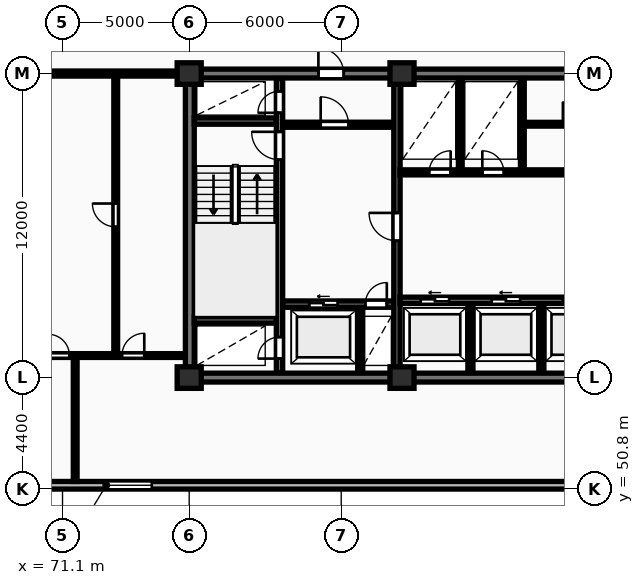
"""IFC4 building model, lengths in metres.
Left out: names, types, materials, properties, quantities, classifications, styles, units other than length and angle.
Written with IfcOpenShell. Run it as: python <this file> out.ifc"""

import sys

from ifc_helpers import new_model, si_unit, direction, frame, frame_2d, origin, origin_2d, place, context, subcontext, project, spatial, rectangle, extrude, element, fill, save


model = new_model("IFC4")
c1 = context("Model", 3, precision=1e-05, world=origin(), true_north=direction((0.0, 1.0)))
c2 = subcontext(c1, "Body", "Model", "MODEL_VIEW")
j1 = project(units=[si_unit("LENGTHUNIT", "METRE"), si_unit("PLANEANGLEUNIT", "RADIAN")], contexts=[c1])
p1 = place(None, origin())
s1 = spatial("IfcSite", under=j1, at=p1, CompositionType="ELEMENT")
p2 = place(p1, origin())
s2 = spatial("IfcBuilding", under=s1, at=p2, CompositionType="ELEMENT")
p3 = place(p2, frame((0.0, 0.0, 93.8)))
s3 = spatial("IfcBuildingStorey", under=s2, at=p3, CompositionType="ELEMENT", Elevation=93.8)
for number, where, z_axis, x_axis in (
    (1, (76.1, 55.2, 0.0), (0.0, 0.0, 1.0), (1.0, 0.0, 0.0)),
    (2, (76.1, 67.2, 0.0), (0.0, 0.0, 1.0), (1.0, 0.0, 0.0)),
    (3, (84.5, 55.2, 0.0), (0.0, 0.0, 1.0), (1.0, 0.0, 0.0)),
    (4, (84.5, 67.2, 0.0), (0.0, 0.0, 1.0), (1.0, 0.0, 0.0)),
):
    element("IfcColumn", number, at=place(p3, frame(where, z_axis=z_axis, x_axis=x_axis)), inside=s3, PredefinedType="COLUMN", context=c2, shape_type="SweptSolid", body=[
        extrude(rectangle(XDim=0.95, YDim=0.85, at=origin_2d()), origin(), (0.0, 0.0, 1.0), 3.25),
    ])
p4 = place(p3, frame((57.6, 50.95, 0.0), z_axis=(0.0, 0.0, 1.0), x_axis=(1.0, 0.0, 0.0)))
e5 = element("IfcWall", 5, at=p4, inside=s3, PredefinedType="STANDARD", context=c2, shape_type="SweptSolid", body=[
    extrude(rectangle(XDim=73.0, YDim=0.3, at=frame_2d((36.5, 0.0))), origin(), (0.0, 0.0, 1.0), 2.97),
])
p5 = place(p4, frame((15.225, 0.0, 0.85)))
e6 = element("IfcOpeningElement", 6, at=p5, cuts=e5, PredefinedType="OPENING", context=c2, shape_type="SweptSolid", body=[
    extrude(rectangle(XDim=1.8, YDim=1.8, at=frame_2d((0.9, 0.9))), frame((0.0, 0.16, 0.0), z_axis=(0.0, -1.0, 0.0), x_axis=(1.0, 0.0, 0.0)), (0.0, 0.0, 1.0), 0.32),
])
p6 = place(p4, frame((58.575, 0.0, 0.85)))
e7 = element("IfcOpeningElement", 7, at=p6, cuts=e5, PredefinedType="OPENING", context=c2, shape_type="SweptSolid", body=[
    extrude(rectangle(XDim=1.8, YDim=1.8, at=frame_2d((0.9, 0.9))), frame((0.0, 0.16, 0.0), z_axis=(0.0, -1.0, 0.0), x_axis=(1.0, 0.0, 0.0)), (0.0, 0.0, 1.0), 0.32),
])
p7 = place(p3, frame((75.95, 55.2, 0.0), z_axis=(0.0, 0.0, 1.0), x_axis=(1.0, 0.0, 0.0)))
e8 = element("IfcWall", 8, at=p7, inside=s3, PredefinedType="SHEAR", context=c2, shape_type="SweptSolid", body=[
    extrude(rectangle(XDim=36.3, YDim=0.35, at=frame_2d((18.15, 0.0))), origin(), (0.0, 0.0, 1.0), 3.25),
])
p8 = place(p3, frame((76.125, 55.375, 0.0), z_axis=(0.0, 0.0, 1.0), x_axis=(0.0, 1.0, 0.0)))
e9 = element("IfcWall", 9, at=p8, inside=s3, PredefinedType="SHEAR", context=c2, shape_type="SweptSolid", body=[
    extrude(rectangle(XDim=11.65, YDim=0.35, at=frame_2d((5.825, 0.0))), origin(), (0.0, 0.0, 1.0), 3.25),
])
p9 = place(p3, frame((75.95, 67.2, 0.0), z_axis=(0.0, 0.0, 1.0), x_axis=(1.0, 0.0, 0.0)))
e10 = element("IfcWall", 10, at=p9, inside=s3, PredefinedType="SHEAR", context=c2, shape_type="SweptSolid", body=[
    extrude(rectangle(XDim=36.3, YDim=0.35, at=frame_2d((18.15, 0.0))), origin(), (0.0, 0.0, 1.0), 3.25),
])
p10 = place(p9, frame((5.25, 0.0, 0.0)))
e11 = element("IfcOpeningElement", 11, at=p10, cuts=e10, PredefinedType="OPENING", context=c2, shape_type="SweptSolid", body=[
    extrude(rectangle(XDim=1.0, YDim=2.15, at=frame_2d((0.5, 1.075))), frame((0.0, 0.185, 0.0), z_axis=(0.0, -1.0, 0.0), x_axis=(1.0, 0.0, 0.0)), (0.0, 0.0, 1.0), 0.37),
])
p11 = place(p9, frame((21.6, 0.0, 0.0)))
e12 = element("IfcOpeningElement", 12, at=p11, cuts=e10, PredefinedType="OPENING", context=c2, shape_type="SweptSolid", body=[
    extrude(rectangle(XDim=1.5, YDim=2.2, at=frame_2d((0.75, 1.1))), frame((0.0, 0.185, 0.0), z_axis=(0.0, -1.0, 0.0), x_axis=(1.0, 0.0, 0.0)), (0.0, 0.0, 1.0), 0.37),
])
p12 = place(p9, frame((30.45, 0.0, 0.0)))
e13 = element("IfcOpeningElement", 13, at=p12, cuts=e10, PredefinedType="OPENING", context=c2, shape_type="SweptSolid", body=[
    extrude(rectangle(XDim=1.0, YDim=2.15, at=frame_2d((0.5, 1.075))), frame((0.0, 0.185, 0.0), z_axis=(0.0, -1.0, 0.0), x_axis=(1.0, 0.0, 0.0)), (0.0, 0.0, 1.0), 0.37),
])
p13 = place(p3, frame((79.665, 55.4, 0.0), z_axis=(0.0, 0.0, 1.0), x_axis=(0.0, 1.0, 0.0)))
e14 = element("IfcWall", 14, at=p13, inside=s3, PredefinedType="SHEAR", context=c2, shape_type="SweptSolid", body=[
    extrude(rectangle(XDim=11.6, YDim=0.25, at=frame_2d((5.8, 0.0))), origin(), (0.0, 0.0, 1.0), 3.25),
])
p14 = place(p13, frame((0.55, 0.0, 0.0)))
e15 = element("IfcOpeningElement", 15, at=p14, cuts=e14, PredefinedType="OPENING", context=c2, shape_type="SweptSolid", body=[
    extrude(rectangle(XDim=0.85, YDim=2.05, at=frame_2d((0.425, 1.025))), frame((0.0, 0.135, 0.0), z_axis=(0.0, -1.0, 0.0), x_axis=(1.0, 0.0, 0.0)), (0.0, 0.0, 1.0), 0.27),
])
p15 = place(p13, frame((8.4, 0.0, 0.0)))
e16 = element("IfcOpeningElement", 16, at=p15, cuts=e14, PredefinedType="OPENING", context=c2, shape_type="SweptSolid", body=[
    extrude(rectangle(XDim=1.1, YDim=2.1, at=frame_2d((0.55, 1.05))), frame((0.0, 0.135, 0.0), z_axis=(0.0, -1.0, 0.0), x_axis=(1.0, 0.0, 0.0)), (0.0, 0.0, 1.0), 0.27),
])
p16 = place(p13, frame((10.25, 0.0, 0.0)))
e17 = element("IfcOpeningElement", 17, at=p16, cuts=e14, PredefinedType="OPENING", context=c2, shape_type="SweptSolid", body=[
    extrude(rectangle(XDim=0.85, YDim=2.05, at=frame_2d((0.425, 1.025))), frame((0.0, 0.135, 0.0), z_axis=(0.0, -1.0, 0.0), x_axis=(1.0, 0.0, 0.0)), (0.0, 0.0, 1.0), 0.27),
])
for number, where, z_axis, x_axis in (
    (18, (76.3, 57.475, 0.0), (0.0, 0.0, 1.0), (1.0, 0.0, 0.0)),
    (19, (76.3, 65.325, 0.0), (0.0, 0.0, 1.0), (1.0, 0.0, 0.0)),
):
    element("IfcWall", number, at=place(p3, frame(where, z_axis=z_axis, x_axis=x_axis)), inside=s3, PredefinedType="SHEAR", context=c2, shape_type="SweptSolid", body=[
        extrude(rectangle(XDim=3.24, YDim=0.25, at=frame_2d((1.62, 0.0))), origin(), (0.0, 0.0, 1.0), 3.25),
    ])
p17 = place(p3, frame((79.79, 58.1, 0.0), z_axis=(0.0, 0.0, 1.0), x_axis=(1.0, 0.0, 0.0)))
e20 = element("IfcWall", 20, at=p17, inside=s3, PredefinedType="SHEAR", context=c2, shape_type="SweptSolid", body=[
    extrude(rectangle(XDim=4.39, YDim=0.25, at=frame_2d((2.195, 0.0))), origin(), (0.0, 0.0, 1.0), 3.25),
])
p18 = place(p17, frame((1.05, 0.0, 0.0)))
e21 = element("IfcOpeningElement", 21, at=p18, cuts=e20, PredefinedType="OPENING", context=c2, shape_type="SweptSolid", body=[
    extrude(rectangle(XDim=1.12, YDim=2.12, at=frame_2d((0.56, 1.06))), frame((0.0, 0.135, 0.0), z_axis=(0.0, -1.0, 0.0), x_axis=(1.0, 0.0, 0.0)), (0.0, 0.0, 1.0), 0.27),
])
p19 = place(p17, frame((3.26, 0.0, 0.0)))
e22 = element("IfcOpeningElement", 22, at=p19, cuts=e20, PredefinedType="OPENING", context=c2, shape_type="SweptSolid", body=[
    extrude(rectangle(XDim=0.85, YDim=2.05, at=frame_2d((0.425, 1.025))), frame((0.0, 0.135, 0.0), z_axis=(0.0, -1.0, 0.0), x_axis=(1.0, 0.0, 0.0)), (0.0, 0.0, 1.0), 0.27),
])
p20 = place(p3, frame((82.85, 55.4, 0.0), z_axis=(0.0, 0.0, 1.0), x_axis=(0.0, 1.0, 0.0)))
e23 = element("IfcWall", 23, at=p20, inside=s3, PredefinedType="PARTITIONING", context=c2, shape_type="SweptSolid", body=[
    extrude(rectangle(XDim=2.56, YDim=0.2, at=frame_2d((1.28, 0.0))), origin(), (0.0, 0.0, 1.0), 2.97),
])
p21 = place(p3, frame((79.79, 65.18, 0.0), z_axis=(0.0, 0.0, 1.0), x_axis=(1.0, 0.0, 0.0)))
e24 = element("IfcWall", 24, at=p21, inside=s3, PredefinedType="PARTITIONING", context=c2, shape_type="SweptSolid", body=[
    extrude(rectangle(XDim=4.39, YDim=0.2, at=frame_2d((2.195, 0.0))), origin(), (0.0, 0.0, 1.0), 2.97),
])
p22 = place(p21, frame((1.5, 0.0, 0.0)))
e25 = element("IfcOpeningElement", 25, at=p22, cuts=e24, PredefinedType="OPENING", context=c2, shape_type="SweptSolid", body=[
    extrude(rectangle(XDim=1.1, YDim=2.1, at=frame_2d((0.55, 1.05))), frame((0.0, 0.11, 0.0), z_axis=(0.0, -1.0, 0.0), x_axis=(1.0, 0.0, 0.0)), (0.0, 0.0, 1.0), 0.22),
])
p23 = place(p3, frame((84.3, 55.4, 0.0), z_axis=(0.0, 0.0, 1.0), x_axis=(0.0, 1.0, 0.0)))
e26 = element("IfcWall", 26, at=p23, inside=s3, PredefinedType="SHEAR", context=c2, shape_type="SweptSolid", body=[
    extrude(rectangle(XDim=11.6, YDim=0.25, at=frame_2d((5.8, 0.0))), origin(), (0.0, 0.0, 1.0), 3.25),
])
p24 = place(p23, frame((5.2, 0.0, 0.0)))
e27 = element("IfcOpeningElement", 27, at=p24, cuts=e26, PredefinedType="OPENING", context=c2, shape_type="SweptSolid", body=[
    extrude(rectangle(XDim=1.1, YDim=2.1, at=frame_2d((0.55, 1.05))), frame((0.0, 0.135, 0.0), z_axis=(0.0, -1.0, 0.0), x_axis=(1.0, 0.0, 0.0)), (0.0, 0.0, 1.0), 0.27),
])
for number, where, z_axis, x_axis in (
    (28, (87.2, 55.4, 0.0), (0.0, 0.0, 1.0), (0.0, 1.0, 0.0)),
    (29, (90.0, 55.4, 0.0), (0.0, 0.0, 1.0), (0.0, 1.0, 0.0)),
):
    element("IfcWall", number, at=place(p3, frame(where, z_axis=z_axis, x_axis=x_axis)), inside=s3, PredefinedType="PARTITIONING", context=c2, shape_type="SweptSolid", body=[
        extrude(rectangle(XDim=2.72, YDim=0.2, at=frame_2d((1.36, 0.0))), origin(), (0.0, 0.0, 1.0), 2.97),
    ])
p25 = place(p3, frame((84.42, 58.25, 0.0), z_axis=(0.0, 0.0, 1.0), x_axis=(1.0, 0.0, 0.0)))
e30 = element("IfcWall", 30, at=p25, inside=s3, PredefinedType="SHEAR", context=c2, shape_type="SweptSolid", body=[
    extrude(rectangle(XDim=8.36, YDim=0.25, at=frame_2d((4.18, 0.0))), origin(), (0.0, 0.0, 1.0), 3.25),
])
p26 = place(p25, frame((0.82, 0.0, 0.0)))
e31 = element("IfcOpeningElement", 31, at=p26, cuts=e30, PredefinedType="OPENING", context=c2, shape_type="SweptSolid", body=[
    extrude(rectangle(XDim=1.12, YDim=2.12, at=frame_2d((0.56, 1.06))), frame((0.0, 0.135, 0.0), z_axis=(0.0, -1.0, 0.0), x_axis=(1.0, 0.0, 0.0)), (0.0, 0.0, 1.0), 0.27),
])
p27 = place(p25, frame((3.62, 0.0, 0.0)))
e32 = element("IfcOpeningElement", 32, at=p27, cuts=e30, PredefinedType="OPENING", context=c2, shape_type="SweptSolid", body=[
    extrude(rectangle(XDim=1.12, YDim=2.12, at=frame_2d((0.56, 1.06))), frame((0.0, 0.135, 0.0), z_axis=(0.0, -1.0, 0.0), x_axis=(1.0, 0.0, 0.0)), (0.0, 0.0, 1.0), 0.27),
])
p28 = place(p25, frame((6.42, 0.0, 0.0)))
e33 = element("IfcOpeningElement", 33, at=p28, cuts=e30, PredefinedType="OPENING", context=c2, shape_type="SweptSolid", body=[
    extrude(rectangle(XDim=1.12, YDim=2.12, at=frame_2d((0.56, 1.06))), frame((0.0, 0.135, 0.0), z_axis=(0.0, -1.0, 0.0), x_axis=(1.0, 0.0, 0.0)), (0.0, 0.0, 1.0), 0.27),
])
for number, where, z_axis, x_axis in (
    (34, (86.8, 63.4, 0.0), (0.0, 0.0, 1.0), (0.0, 1.0, 0.0)),
    (35, (89.25, 63.4, 0.0), (0.0, 0.0, 1.0), (0.0, 1.0, 0.0)),
):
    element("IfcWall", number, at=place(p3, frame(where, z_axis=z_axis, x_axis=x_axis)), inside=s3, PredefinedType="PARTITIONING", context=c2, shape_type="SweptSolid", body=[
        extrude(rectangle(XDim=3.6, YDim=0.15, at=frame_2d((1.8, 0.0))), origin(), (0.0, 0.0, 1.0), 2.97),
    ])
p29 = place(p3, frame((89.25, 65.2, 0.0), z_axis=(0.0, 0.0, 1.0), x_axis=(1.0, 0.0, 0.0)))
e36 = element("IfcWall", 36, at=p29, inside=s3, PredefinedType="PARTITIONING", context=c2, shape_type="SweptSolid", body=[
    extrude(rectangle(XDim=7.05, YDim=0.15, at=frame_2d((3.525, 0.0))), origin(), (0.0, 0.0, 1.0), 2.97),
])
p30 = place(p29, frame((1.6, 0.0, 0.0)))
e37 = element("IfcOpeningElement", 37, at=p30, cuts=e36, PredefinedType="OPENING", context=c2, shape_type="SweptSolid", body=[
    extrude(rectangle(XDim=0.88, YDim=2.06, at=frame_2d((0.44, 1.03))), frame((0.0, 0.085, 0.0), z_axis=(0.0, -1.0, 0.0), x_axis=(1.0, 0.0, 0.0)), (0.0, 0.0, 1.0), 0.17),
])
p31 = place(p3, frame((84.42, 63.3, 0.0), z_axis=(0.0, 0.0, 1.0), x_axis=(1.0, 0.0, 0.0)))
e38 = element("IfcWall", 38, at=p31, inside=s3, PredefinedType="PARTITIONING", context=c2, shape_type="SweptSolid", body=[
    extrude(rectangle(XDim=19.83, YDim=0.2, at=frame_2d((9.915, 0.0))), origin(), (0.0, 0.0, 1.0), 2.97),
])
p32 = place(p31, frame((1.15, 0.0, 0.0)))
e39 = element("IfcOpeningElement", 39, at=p32, cuts=e38, PredefinedType="OPENING", context=c2, shape_type="SweptSolid", body=[
    extrude(rectangle(XDim=0.85, YDim=2.05, at=frame_2d((0.425, 1.025))), frame((0.0, 0.11, 0.0), z_axis=(0.0, -1.0, 0.0), x_axis=(1.0, 0.0, 0.0)), (0.0, 0.0, 1.0), 0.22),
])
p33 = place(p31, frame((3.25, 0.0, 0.0)))
e40 = element("IfcOpeningElement", 40, at=p33, cuts=e38, PredefinedType="OPENING", context=c2, shape_type="SweptSolid", body=[
    extrude(rectangle(XDim=0.85, YDim=2.05, at=frame_2d((0.425, 1.025))), frame((0.0, 0.11, 0.0), z_axis=(0.0, -1.0, 0.0), x_axis=(1.0, 0.0, 0.0)), (0.0, 0.0, 1.0), 0.22),
])
p34 = place(p31, frame((13.08, 0.0, 0.0)))
e41 = element("IfcOpeningElement", 41, at=p34, cuts=e38, PredefinedType="OPENING", context=c2, shape_type="SweptSolid", body=[
    extrude(rectangle(XDim=1.5, YDim=2.2, at=frame_2d((0.75, 1.1))), frame((0.0, 0.11, 0.0), z_axis=(0.0, -1.0, 0.0), x_axis=(1.0, 0.0, 0.0)), (0.0, 0.0, 1.0), 0.22),
])
p35 = place(p31, frame((6.68, 0.0, 0.0)))
e42 = element("IfcOpeningElement", 42, at=p35, cuts=e38, PredefinedType="OPENING", context=c2, shape_type="SweptSolid", body=[
    extrude(rectangle(XDim=0.92, YDim=2.08, at=frame_2d((0.46, 1.04))), frame((0.0, 0.11, 0.0), z_axis=(0.0, -1.0, 0.0), x_axis=(1.0, 0.0, 0.0)), (0.0, 0.0, 1.0), 0.22),
])
p36 = place(p31, frame((16.33, 0.0, 0.0)))
e43 = element("IfcOpeningElement", 43, at=p36, cuts=e38, PredefinedType="OPENING", context=c2, shape_type="SweptSolid", body=[
    extrude(rectangle(XDim=0.88, YDim=2.06, at=frame_2d((0.44, 1.03))), frame((0.0, 0.11, 0.0), z_axis=(0.0, -1.0, 0.0), x_axis=(1.0, 0.0, 0.0)), (0.0, 0.0, 1.0), 0.22),
])
p37 = place(p3, frame((73.2, 56.07, 0.0), z_axis=(0.0, 0.0, 1.0), x_axis=(0.0, 1.0, 0.0)))
e44 = element("IfcWall", 44, at=p37, inside=s3, PredefinedType="PARTITIONING", context=c2, shape_type="SweptSolid", body=[
    extrude(rectangle(XDim=11.08, YDim=0.15, at=frame_2d((5.54, 0.0))), origin(), (0.0, 0.0, 1.0), 2.97),
])
p38 = place(p37, frame((5.08, 0.0, 0.0)))
e45 = element("IfcOpeningElement", 45, at=p38, cuts=e44, PredefinedType="OPENING", context=c2, shape_type="SweptSolid", body=[
    extrude(rectangle(XDim=0.92, YDim=2.08, at=frame_2d((0.46, 1.04))), frame((0.0, 0.085, 0.0), z_axis=(0.0, -1.0, 0.0), x_axis=(1.0, 0.0, 0.0)), (0.0, 0.0, 1.0), 0.17),
])
p39 = place(p3, frame((71.6, 51.1, 0.0), z_axis=(0.0, 0.0, 1.0), x_axis=(0.0, 1.0, 0.0)))
e46 = element("IfcWall", 46, at=p39, inside=s3, PredefinedType="PARTITIONING", context=c2, shape_type="SweptSolid", body=[
    extrude(rectangle(XDim=4.97, YDim=0.15, at=frame_2d((2.485, 0.0))), origin(), (0.0, 0.0, 1.0), 2.97),
])
p40 = place(p3, frame((69.17, 56.07, 0.0), z_axis=(0.0, 0.0, 1.0), x_axis=(1.0, 0.0, 0.0)))
e47 = element("IfcWall", 47, at=p40, inside=s3, PredefinedType="PARTITIONING", context=c2, shape_type="SweptSolid", body=[
    extrude(rectangle(XDim=6.76, YDim=0.15, at=frame_2d((3.38, 0.0))), origin(), (0.0, 0.0, 1.0), 2.97),
])
p41 = place(p40, frame((1.362, 0.0, 0.0)))
e48 = element("IfcOpeningElement", 48, at=p41, cuts=e47, PredefinedType="OPENING", context=c2, shape_type="SweptSolid", body=[
    extrude(rectangle(XDim=0.84, YDim=2.04, at=frame_2d((0.42, 1.02))), frame((0.0, 0.085, 0.0), z_axis=(0.0, -1.0, 0.0), x_axis=(1.0, 0.0, 0.0)), (0.0, 0.0, 1.0), 0.17),
])
p42 = place(p40, frame((4.277, 0.0, 0.0)))
e49 = element("IfcOpeningElement", 49, at=p42, cuts=e47, PredefinedType="OPENING", context=c2, shape_type="SweptSolid", body=[
    extrude(rectangle(XDim=0.88, YDim=2.06, at=frame_2d((0.44, 1.03))), frame((0.0, 0.085, 0.0), z_axis=(0.0, -1.0, 0.0), x_axis=(1.0, 0.0, 0.0)), (0.0, 0.0, 1.0), 0.17),
])
p43 = place(p3, frame((57.6, 67.2, 0.0), z_axis=(0.0, 0.0, 1.0), x_axis=(1.0, 0.0, 0.0)))
e50 = element("IfcWall", 50, at=p43, inside=s3, PredefinedType="PARTITIONING", context=c2, shape_type="SweptSolid", body=[
    extrude(rectangle(XDim=18.35, YDim=0.2, at=frame_2d((9.175, 0.0))), origin(), (0.0, 0.0, 1.0), 2.433),
])
p44 = place(p43, frame((12.075, 0.0, 0.0)))
e51 = element("IfcOpeningElement", 51, at=p44, cuts=e50, PredefinedType="OPENING", context=c2, shape_type="SweptSolid", body=[
    extrude(rectangle(XDim=0.95, YDim=2.15, at=frame_2d((0.475, 1.075))), frame((0.0, 0.11, 0.0), z_axis=(0.0, -1.0, 0.0), x_axis=(1.0, 0.0, 0.0)), (0.0, 0.0, 1.0), 0.22),
])
p45 = place(p5, origin())
e52 = element("IfcWindow", 52, at=p45, inside=s3, PartitioningType="SINGLE_PANEL", PredefinedType="WINDOW", context=c2, shape_type="SweptSolid", body=[
    extrude(rectangle(XDim=1.8, YDim=1.8, at=frame_2d((0.9, 0.9))), frame((0.0, 0.03, 0.0), z_axis=(0.0, -1.0, 0.0), x_axis=(1.0, 0.0, 0.0)), (0.0, 0.0, 1.0), 0.06),
])
fill(e6, e52)
p46 = place(p10, origin())
e53 = element("IfcDoor", 53, at=p46, inside=s3, OperationType="SINGLE_SWING_LEFT", PredefinedType="DOOR", context=c2, shape_type="SweptSolid", body=[
    extrude(rectangle(XDim=1.0, YDim=2.15, at=frame_2d((0.5, 1.075))), frame((0.0, 0.025, 0.0), z_axis=(0.0, -1.0, 0.0), x_axis=(1.0, 0.0, 0.0)), (0.0, 0.0, 1.0), 0.05),
])
fill(e11, e53)
p47 = place(p14, origin())
e54 = element("IfcDoor", 54, at=p47, inside=s3, OperationType="SINGLE_SWING_LEFT", PredefinedType="DOOR", context=c2, shape_type="SweptSolid", body=[
    extrude(rectangle(XDim=0.85, YDim=2.05, at=frame_2d((0.425, 1.025))), frame((0.0, 0.025, 0.0), z_axis=(0.0, -1.0, 0.0), x_axis=(1.0, 0.0, 0.0)), (0.0, 0.0, 1.0), 0.05),
])
fill(e15, e54)
p48 = place(p15, origin())
e55 = element("IfcDoor", 55, at=p48, inside=s3, OperationType="SINGLE_SWING_RIGHT", PredefinedType="DOOR", context=c2, shape_type="SweptSolid", body=[
    extrude(rectangle(XDim=1.1, YDim=2.1, at=frame_2d((0.55, 1.05))), frame((0.0, 0.025, 0.0), z_axis=(0.0, -1.0, 0.0), x_axis=(1.0, 0.0, 0.0)), (0.0, 0.0, 1.0), 0.05),
])
fill(e16, e55)
p49 = place(p16, origin())
e56 = element("IfcDoor", 56, at=p49, inside=s3, OperationType="SINGLE_SWING_LEFT", PredefinedType="DOOR", context=c2, shape_type="SweptSolid", body=[
    extrude(rectangle(XDim=0.85, YDim=2.05, at=frame_2d((0.425, 1.025))), frame((0.0, 0.025, 0.0), z_axis=(0.0, -1.0, 0.0), x_axis=(1.0, 0.0, 0.0)), (0.0, 0.0, 1.0), 0.05),
])
fill(e17, e56)
p50 = place(p18, origin())
e57 = element("IfcDoor", 57, at=p50, inside=s3, OperationType="SLIDING_TO_LEFT", PredefinedType="DOOR", context=c2, shape_type="SweptSolid", body=[
    extrude(rectangle(XDim=1.12, YDim=2.12, at=frame_2d((0.56, 1.06))), frame((0.0, 0.025, 0.0), z_axis=(0.0, -1.0, 0.0), x_axis=(1.0, 0.0, 0.0)), (0.0, 0.0, 1.0), 0.05),
])
fill(e21, e57)
p51 = place(p19, origin())
e58 = element("IfcDoor", 58, at=p51, inside=s3, OperationType="SINGLE_SWING_RIGHT", PredefinedType="DOOR", context=c2, shape_type="SweptSolid", body=[
    extrude(rectangle(XDim=0.85, YDim=2.05, at=frame_2d((0.425, 1.025))), frame((0.0, 0.025, 0.0), z_axis=(0.0, -1.0, 0.0), x_axis=(1.0, 0.0, 0.0)), (0.0, 0.0, 1.0), 0.05),
])
fill(e22, e58)
p52 = place(p22, origin())
e59 = element("IfcDoor", 59, at=p52, inside=s3, OperationType="SINGLE_SWING_LEFT", PredefinedType="DOOR", context=c2, shape_type="SweptSolid", body=[
    extrude(rectangle(XDim=1.1, YDim=2.1, at=frame_2d((0.55, 1.05))), frame((0.0, 0.025, 0.0), z_axis=(0.0, -1.0, 0.0), x_axis=(1.0, 0.0, 0.0)), (0.0, 0.0, 1.0), 0.05),
])
fill(e25, e59)
p53 = place(p24, origin())
e60 = element("IfcDoor", 60, at=p53, inside=s3, OperationType="SINGLE_SWING_RIGHT", PredefinedType="DOOR", context=c2, shape_type="SweptSolid", body=[
    extrude(rectangle(XDim=1.1, YDim=2.1, at=frame_2d((0.55, 1.05))), frame((0.0, 0.025, 0.0), z_axis=(0.0, -1.0, 0.0), x_axis=(1.0, 0.0, 0.0)), (0.0, 0.0, 1.0), 0.05),
])
fill(e27, e60)
p54 = place(p26, origin())
e61 = element("IfcDoor", 61, at=p54, inside=s3, OperationType="SLIDING_TO_LEFT", PredefinedType="DOOR", context=c2, shape_type="SweptSolid", body=[
    extrude(rectangle(XDim=1.12, YDim=2.12, at=frame_2d((0.56, 1.06))), frame((0.0, 0.025, 0.0), z_axis=(0.0, -1.0, 0.0), x_axis=(1.0, 0.0, 0.0)), (0.0, 0.0, 1.0), 0.05),
])
fill(e31, e61)
p55 = place(p27, origin())
e62 = element("IfcDoor", 62, at=p55, inside=s3, OperationType="SLIDING_TO_LEFT", PredefinedType="DOOR", context=c2, shape_type="SweptSolid", body=[
    extrude(rectangle(XDim=1.12, YDim=2.12, at=frame_2d((0.56, 1.06))), frame((0.0, 0.025, 0.0), z_axis=(0.0, -1.0, 0.0), x_axis=(1.0, 0.0, 0.0)), (0.0, 0.0, 1.0), 0.05),
])
fill(e32, e62)
p56 = place(p28, origin())
e63 = element("IfcDoor", 63, at=p56, inside=s3, OperationType="SLIDING_TO_LEFT", PredefinedType="DOOR", context=c2, shape_type="SweptSolid", body=[
    extrude(rectangle(XDim=1.12, YDim=2.12, at=frame_2d((0.56, 1.06))), frame((0.0, 0.025, 0.0), z_axis=(0.0, -1.0, 0.0), x_axis=(1.0, 0.0, 0.0)), (0.0, 0.0, 1.0), 0.05),
])
fill(e33, e63)
p57 = place(p30, origin())
e64 = element("IfcDoor", 64, at=p57, inside=s3, OperationType="SINGLE_SWING_LEFT", PredefinedType="DOOR", context=c2, shape_type="SweptSolid", body=[
    extrude(rectangle(XDim=0.88, YDim=2.06, at=frame_2d((0.44, 1.03))), frame((0.0, 0.025, 0.0), z_axis=(0.0, -1.0, 0.0), x_axis=(1.0, 0.0, 0.0)), (0.0, 0.0, 1.0), 0.05),
])
fill(e37, e64)
p58 = place(p32, origin())
e65 = element("IfcDoor", 65, at=p58, inside=s3, OperationType="SINGLE_SWING_RIGHT", PredefinedType="DOOR", context=c2, shape_type="SweptSolid", body=[
    extrude(rectangle(XDim=0.85, YDim=2.05, at=frame_2d((0.425, 1.025))), frame((0.0, 0.025, 0.0), z_axis=(0.0, -1.0, 0.0), x_axis=(1.0, 0.0, 0.0)), (0.0, 0.0, 1.0), 0.05),
])
fill(e39, e65)
p59 = place(p33, origin())
e66 = element("IfcDoor", 66, at=p59, inside=s3, OperationType="SINGLE_SWING_LEFT", PredefinedType="DOOR", context=c2, shape_type="SweptSolid", body=[
    extrude(rectangle(XDim=0.85, YDim=2.05, at=frame_2d((0.425, 1.025))), frame((0.0, 0.025, 0.0), z_axis=(0.0, -1.0, 0.0), x_axis=(1.0, 0.0, 0.0)), (0.0, 0.0, 1.0), 0.05),
])
fill(e40, e66)
p60 = place(p38, origin())
e67 = element("IfcDoor", 67, at=p60, inside=s3, OperationType="SINGLE_SWING_RIGHT", PredefinedType="DOOR", context=c2, shape_type="SweptSolid", body=[
    extrude(rectangle(XDim=0.92, YDim=2.08, at=frame_2d((0.46, 1.04))), frame((0.0, 0.025, 0.0), z_axis=(0.0, -1.0, 0.0), x_axis=(1.0, 0.0, 0.0)), (0.0, 0.0, 1.0), 0.05),
])
fill(e45, e67)
p61 = place(p41, origin())
e68 = element("IfcDoor", 68, at=p61, inside=s3, OperationType="SINGLE_SWING_LEFT", PredefinedType="DOOR", context=c2, shape_type="SweptSolid", body=[
    extrude(rectangle(XDim=0.84, YDim=2.04, at=frame_2d((0.42, 1.02))), frame((0.0, 0.025, 0.0), z_axis=(0.0, -1.0, 0.0), x_axis=(1.0, 0.0, 0.0)), (0.0, 0.0, 1.0), 0.05),
])
fill(e48, e68)
p62 = place(p42, origin())
e69 = element("IfcDoor", 69, at=p62, inside=s3, OperationType="SINGLE_SWING_RIGHT", PredefinedType="DOOR", context=c2, shape_type="SweptSolid", body=[
    extrude(rectangle(XDim=0.88, YDim=2.06, at=frame_2d((0.44, 1.03))), frame((0.0, 0.025, 0.0), z_axis=(0.0, -1.0, 0.0), x_axis=(1.0, 0.0, 0.0)), (0.0, 0.0, 1.0), 0.05),
])
fill(e49, e69)
save(model, sys.argv[1])
